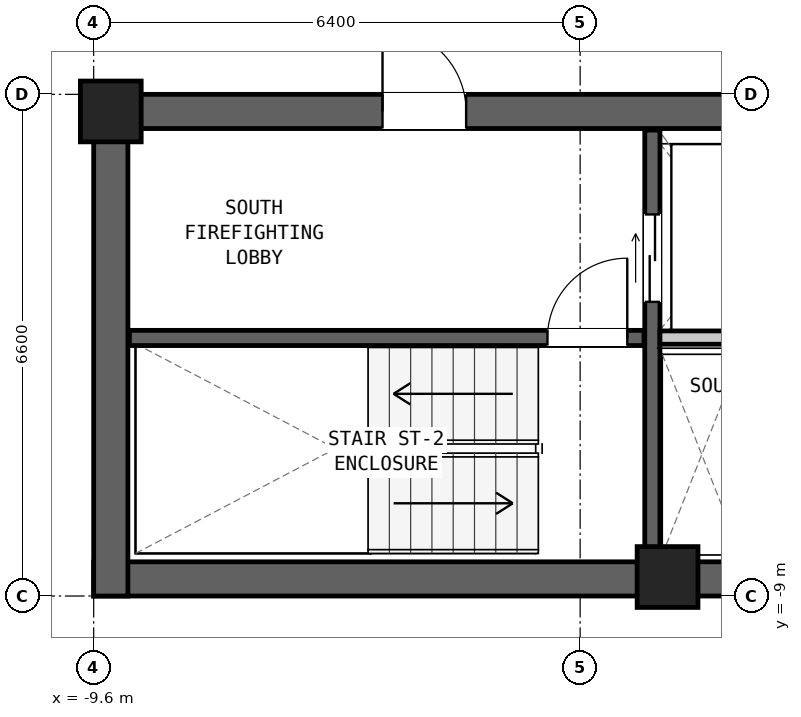
"""IFC4 building model, lengths in metres.
Left out: names, types, materials, properties, quantities, classifications, styles, units other than length and angle.
Written with IfcOpenShell. Run it as: python <this file> out.ifc"""

import sys

from ifc_helpers import new_model, si_unit, direction, frame, frame_2d, origin, origin_2d, place, context, subcontext, project, spatial, rectangle, extrude, element, fill, save


model = new_model("IFC4")
c1 = context("Model", 3, precision=1e-05, world=origin(), true_north=direction((0.0, 1.0)))
c2 = subcontext(c1, "Body", "Model", "MODEL_VIEW")
j1 = project(units=[si_unit("LENGTHUNIT", "METRE"), si_unit("PLANEANGLEUNIT", "RADIAN")], contexts=[c1])
p1 = place(None, origin())
s1 = spatial("IfcSite", under=j1, at=p1, CompositionType="ELEMENT")
p2 = place(p1, origin())
s2 = spatial("IfcBuilding", under=s1, at=p2, CompositionType="ELEMENT")
p3 = place(p2, frame((0.0, 0.0, 261.15)))
s3 = spatial("IfcBuildingStorey", under=s2, at=p3, CompositionType="ELEMENT", Elevation=261.15)
p4 = place(p3, frame((-9.6, -8.775, 0.0), z_axis=(0.0, 0.0, 1.0), x_axis=(1.0, 0.0, 0.0)))
e1 = element("IfcWall", 1, at=p4, inside=s3, PredefinedType="SHEAR", context=c2, shape_type="SweptSolid", body=[
    extrude(rectangle(XDim=19.2, YDim=0.45, at=frame_2d((9.6, 0.0))), origin(), (0.0, 0.0, 1.0), 3.05),
])
p5 = place(p3, frame((-9.6, -2.625, 0.0), z_axis=(0.0, 0.0, 1.0), x_axis=(1.0, 0.0, 0.0)))
e2 = element("IfcWall", 2, at=p5, inside=s3, PredefinedType="SHEAR", context=c2, shape_type="SweptSolid", body=[
    extrude(rectangle(XDim=19.2, YDim=0.45, at=frame_2d((9.6, 0.0))), origin(), (0.0, 0.0, 1.0), 3.05),
])
p6 = place(p5, frame((3.8, 0.0, 0.0)))
e3 = element("IfcOpeningElement", 3, at=p6, cuts=e2, PredefinedType="OPENING", context=c2, shape_type="SweptSolid", body=[
    extrude(rectangle(XDim=1.1, YDim=2.08, at=frame_2d((0.55, 1.04))), frame((0.0, 0.237, 0.0), z_axis=(0.0, -1.0, 0.0), x_axis=(1.0, 0.0, 0.0)), (0.0, 0.0, 1.0), 0.474),
])
p7 = place(p5, frame((10.15, 0.0, 0.0)))
e4 = element("IfcOpeningElement", 4, at=p7, cuts=e2, PredefinedType="OPENING", context=c2, shape_type="SweptSolid", body=[
    extrude(rectangle(XDim=0.9, YDim=2.05, at=frame_2d((0.45, 1.025))), frame((0.0, 0.237, 0.0), z_axis=(0.0, -1.0, 0.0), x_axis=(1.0, 0.0, 0.0)), (0.0, 0.0, 1.0), 0.474),
])
p8 = place(p5, frame((12.1, 0.0, 0.0)))
e5 = element("IfcOpeningElement", 5, at=p8, cuts=e2, PredefinedType="OPENING", context=c2, shape_type="SweptSolid", body=[
    extrude(rectangle(XDim=0.95, YDim=2.1, at=frame_2d((0.475, 1.05))), frame((0.0, 0.237, 0.0), z_axis=(0.0, -1.0, 0.0), x_axis=(1.0, 0.0, 0.0)), (0.0, 0.0, 1.0), 0.474),
])
p9 = place(p5, frame((14.8, 0.0, 0.0)))
e6 = element("IfcOpeningElement", 6, at=p9, cuts=e2, PredefinedType="OPENING", context=c2, shape_type="SweptSolid", body=[
    extrude(rectangle(XDim=1.6, YDim=2.12, at=frame_2d((0.8, 1.06))), frame((0.0, 0.237, 0.0), z_axis=(0.0, -1.0, 0.0), x_axis=(1.0, 0.0, 0.0)), (0.0, 0.0, 1.0), 0.474),
])
p10 = place(p3, frame((-9.375, -9.0, 0.0), z_axis=(0.0, 0.0, 1.0), x_axis=(0.0, 1.0, 0.0)))
e7 = element("IfcWall", 7, at=p10, inside=s3, PredefinedType="SHEAR", context=c2, shape_type="SweptSolid", body=[
    extrude(rectangle(XDim=6.6, YDim=0.45, at=frame_2d((3.3, 0.0))), origin(), (0.0, 0.0, 1.0), 3.05),
])
for number, where, z_axis, x_axis in (
    (8, (-9.375, -2.625, 0.0), (0.0, 0.0, 1.0), (1.0, 0.0, 0.0)),
    (9, (-2.05, -8.75, 0.0), (0.0, 0.0, 1.0), (1.0, 0.0, 0.0)),
):
    element("IfcColumn", number, at=place(p3, frame(where, z_axis=z_axis, x_axis=x_axis)), inside=s3, PredefinedType="COLUMN", context=c2, shape_type="SweptSolid", body=[
        extrude(rectangle(XDim=0.8, YDim=0.8, at=origin_2d()), origin(), (0.0, 0.0, 1.0), 3.05),
    ])
p11 = place(p3, frame((-9.13, -5.605, 0.0), z_axis=(0.0, 0.0, 1.0), x_axis=(1.0, 0.0, 0.0)))
e10 = element("IfcWall", 10, at=p11, inside=s3, PredefinedType="SHEAR", context=c2, shape_type="SweptSolid", body=[
    extrude(rectangle(XDim=6.77, YDim=0.2, at=frame_2d((3.385, 0.0))), origin(), (0.0, 0.0, 1.0), 2.86),
])
p12 = place(p11, frame((5.5, 0.0, 0.0)))
e11 = element("IfcOpeningElement", 11, at=p12, cuts=e10, PredefinedType="OPENING", context=c2, shape_type="SweptSolid", body=[
    extrude(rectangle(XDim=1.05, YDim=2.08, at=frame_2d((0.525, 1.04))), frame((0.0, 0.112, 0.0), z_axis=(0.0, -1.0, 0.0), x_axis=(1.0, 0.0, 0.0)), (0.0, 0.0, 1.0), 0.224),
])
p13 = place(p3, frame((-2.25, -8.53, 0.0), z_axis=(0.0, 0.0, 1.0), x_axis=(0.0, 1.0, 0.0)))
e12 = element("IfcWall", 12, at=p13, inside=s3, PredefinedType="SHEAR", context=c2, shape_type="SweptSolid", body=[
    extrude(rectangle(XDim=5.66, YDim=0.2, at=frame_2d((2.83, 0.0))), origin(), (0.0, 0.0, 1.0), 2.86),
])
p14 = place(p13, frame((3.4, 0.0, 0.0)))
e13 = element("IfcOpeningElement", 13, at=p14, cuts=e12, PredefinedType="OPENING", context=c2, shape_type="SweptSolid", body=[
    extrude(rectangle(XDim=1.15, YDim=2.08, at=frame_2d((0.575, 1.04))), frame((0.0, 0.112, 0.0), z_axis=(0.0, -1.0, 0.0), x_axis=(1.0, 0.0, 0.0)), (0.0, 0.0, 1.0), 0.224),
])
p15 = place(p3, frame((-2.15, -5.6, 0.0), z_axis=(0.0, 0.0, 1.0), x_axis=(1.0, 0.0, 0.0)))
e14 = element("IfcWall", 14, at=p15, inside=s3, PredefinedType="PARTITIONING", context=c2, shape_type="SweptSolid", body=[
    extrude(rectangle(XDim=1.97, YDim=0.175, at=frame_2d((0.985, 0.0))), origin(), (0.0, 0.0, 1.0), 2.86),
])
p16 = place(p12, origin())
e15 = element("IfcDoor", 15, at=p16, inside=s3, OperationType="SINGLE_SWING_RIGHT", PredefinedType="DOOR", context=c2, shape_type="SweptSolid", body=[
    extrude(rectangle(XDim=1.05, YDim=2.08, at=frame_2d((0.525, 1.04))), frame((0.0, 0.025, 0.0), z_axis=(0.0, -1.0, 0.0), x_axis=(1.0, 0.0, 0.0)), (0.0, 0.0, 1.0), 0.05),
])
fill(e11, e15)
p17 = place(p6, origin())
e16 = element("IfcDoor", 16, at=p17, inside=s3, OperationType="SINGLE_SWING_LEFT", PredefinedType="DOOR", context=c2, shape_type="SweptSolid", body=[
    extrude(rectangle(XDim=1.1, YDim=2.08, at=frame_2d((0.55, 1.04))), frame((0.0, 0.025, 0.0), z_axis=(0.0, -1.0, 0.0), x_axis=(1.0, 0.0, 0.0)), (0.0, 0.0, 1.0), 0.05),
])
fill(e3, e16)
p18 = place(p14, origin())
e17 = element("IfcDoor", 17, at=p18, inside=s3, OperationType="DOUBLE_DOOR_SLIDING", PredefinedType="DOOR", context=c2, shape_type="SweptSolid", body=[
    extrude(rectangle(XDim=1.15, YDim=2.08, at=frame_2d((0.575, 1.04))), frame((0.0, 0.025, 0.0), z_axis=(0.0, -1.0, 0.0), x_axis=(1.0, 0.0, 0.0)), (0.0, 0.0, 1.0), 0.05),
])
fill(e13, e17)
save(model, sys.argv[1])
